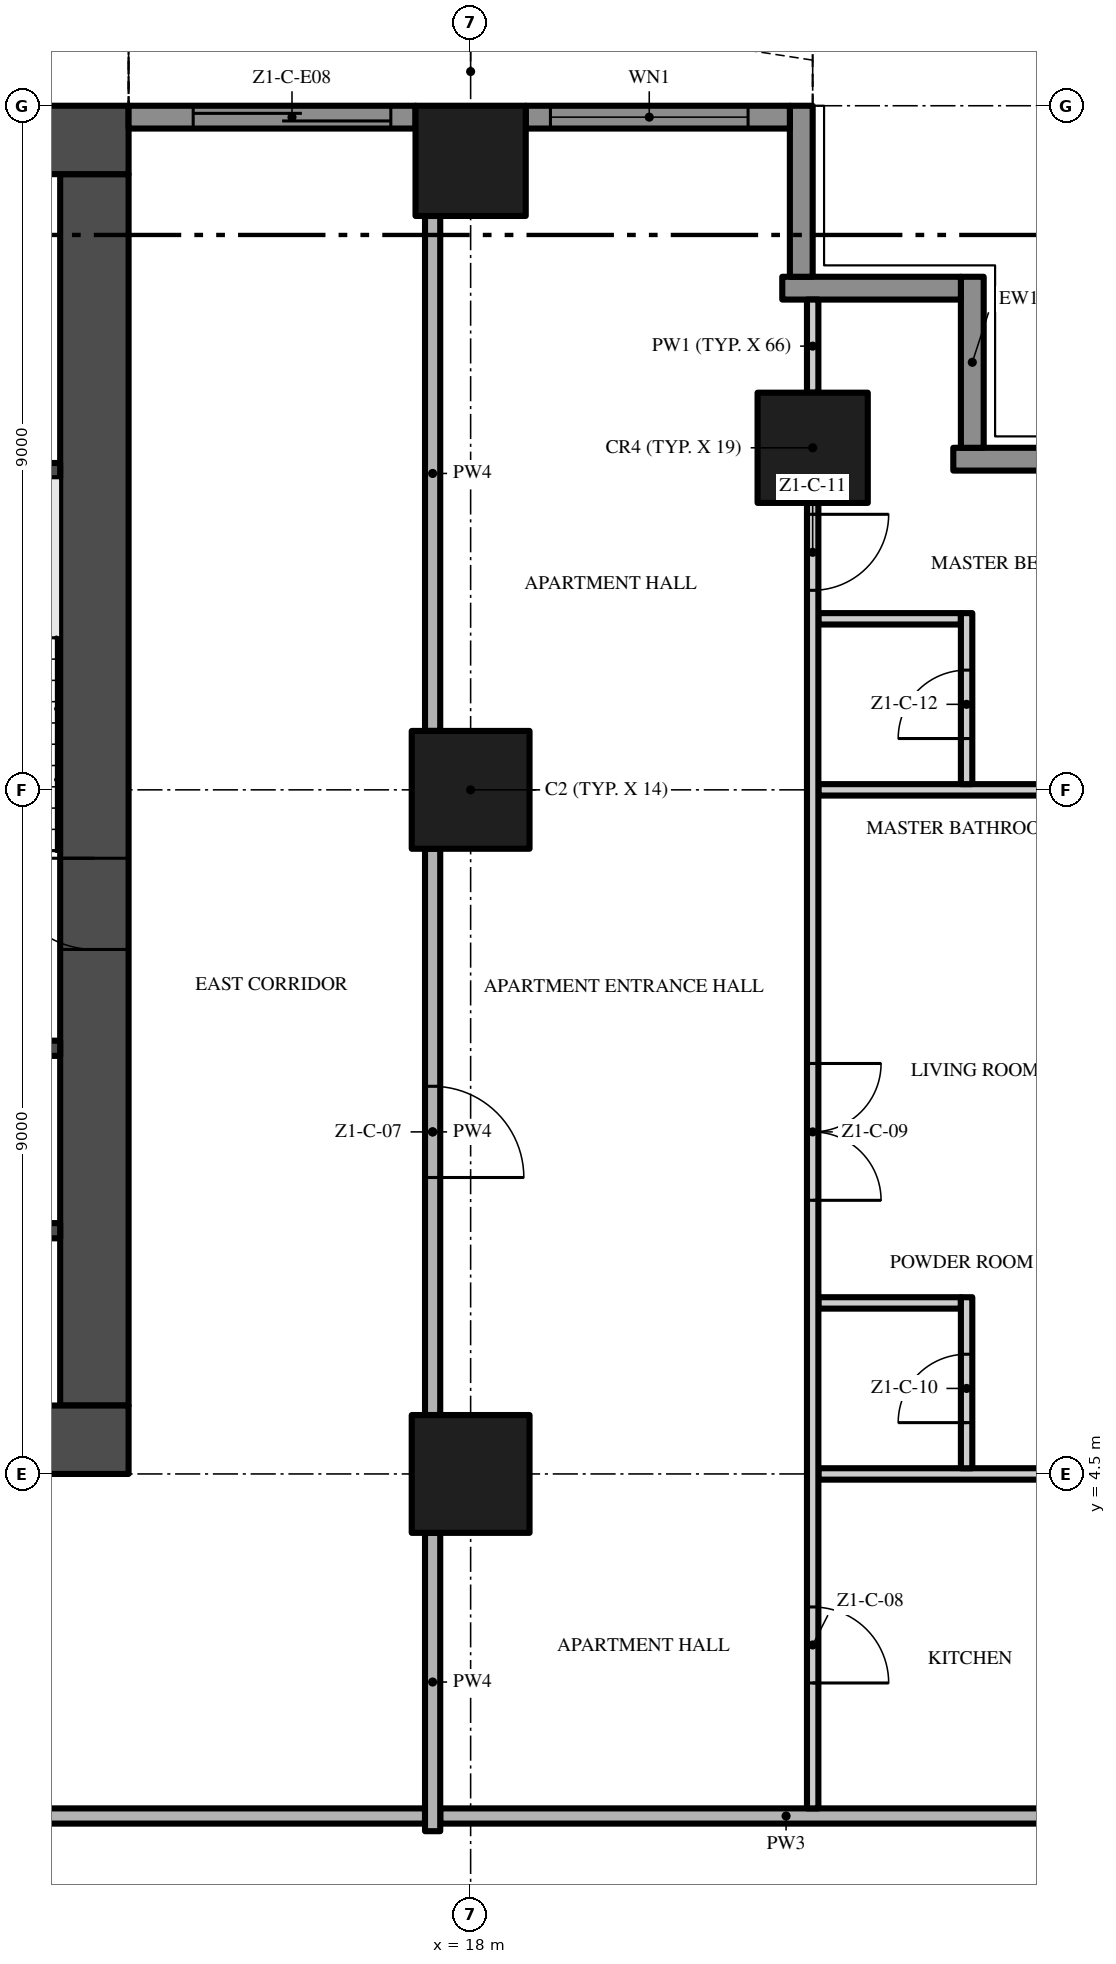
"""IFC4 building model, lengths in metres.
Left out: names, types, materials, properties, quantities, classifications, styles, units other than length and angle.
Written with IfcOpenShell. Run it as: python <this file> out.ifc"""

import sys

from ifc_helpers import new_model, si_unit, direction, frame, frame_2d, origin, origin_2d, place, context, subcontext, project, spatial, polyline, rectangle, outline, extrude, element, fill, save


model = new_model("IFC4")
c1 = context("Model", 3, precision=1e-05, world=origin(), true_north=direction((0.0, 1.0)))
c2 = subcontext(c1, "Body", "Model", "MODEL_VIEW")
j1 = project(units=[si_unit("LENGTHUNIT", "METRE"), si_unit("PLANEANGLEUNIT", "RADIAN")], contexts=[c1])
p1 = place(None, origin())
s1 = spatial("IfcSite", under=j1, at=p1, CompositionType="ELEMENT")
p2 = place(p1, origin())
s2 = spatial("IfcBuilding", under=s1, at=p2, CompositionType="ELEMENT")
p3 = place(p2, frame((0.0, 0.0, 37.8)))
s3 = spatial("IfcBuildingStorey", under=s2, at=p3, CompositionType="ELEMENT", Elevation=37.8)
p4 = place(p3, frame((-13.5, 4.95, -0.3), z_axis=(0.0, 0.0, 1.0), x_axis=(1.0, 0.0, 0.0)))
e1 = element("IfcWall", 1, at=p4, inside=s3, PredefinedType="SHEAR", context=c2, shape_type="SweptSolid", body=[
    extrude(rectangle(XDim=27.0, YDim=0.9, at=frame_2d((13.5, 0.0))), origin(), (0.0, 0.0, 1.0), 3.8),
])
p5 = place(p4, frame((12.0, 0.0, 0.3)))
e2 = element("IfcOpeningElement", 2, at=p5, cuts=e1, PredefinedType="OPENING", context=c2, shape_type="SweptSolid", body=[
    extrude(rectangle(XDim=3.0, YDim=2.4, at=frame_2d((1.5, 1.2))), frame((0.0, 0.46, 0.0), z_axis=(0.0, -1.0, 0.0), x_axis=(1.0, 0.0, 0.0)), (0.0, 0.0, 1.0), 0.92),
])
p6 = place(p4, frame((4.9, 0.0, 0.3)))
e3 = element("IfcOpeningElement", 3, at=p6, cuts=e1, PredefinedType="OPENING", context=c2, shape_type="SweptSolid", body=[
    extrude(rectangle(XDim=1.2, YDim=2.2, at=frame_2d((0.6, 1.1))), frame((0.0, 0.46, 0.0), z_axis=(0.0, -1.0, 0.0), x_axis=(1.0, 0.0, 0.0)), (0.0, 0.0, 1.0), 0.92),
])
p7 = place(p4, frame((20.75, 0.0, 0.3)))
e4 = element("IfcOpeningElement", 4, at=p7, cuts=e1, PredefinedType="OPENING", context=c2, shape_type="SweptSolid", body=[
    extrude(rectangle(XDim=1.5, YDim=2.2, at=frame_2d((0.75, 1.1))), frame((0.0, 0.46, 0.0), z_axis=(0.0, -1.0, 0.0), x_axis=(1.0, 0.0, 0.0)), (0.0, 0.0, 1.0), 0.92),
])
p8 = place(p4, frame((17.4, 0.0, 0.3)))
e5 = element("IfcOpeningElement", 5, at=p8, cuts=e1, PredefinedType="OPENING", context=c2, shape_type="SweptSolid", body=[
    extrude(rectangle(XDim=1.2, YDim=2.2, at=frame_2d((0.6, 1.1))), frame((0.0, 0.46, 0.0), z_axis=(0.0, -1.0, 0.0), x_axis=(1.0, 0.0, 0.0)), (0.0, 0.0, 1.0), 0.92),
])
p9 = place(p3, frame((13.05, 5.4, -0.3), z_axis=(0.0, 0.0, 1.0), x_axis=(0.0, 1.0, 0.0)))
e6 = element("IfcWall", 6, at=p9, inside=s3, PredefinedType="SHEAR", context=c2, shape_type="SweptSolid", body=[
    extrude(rectangle(XDim=16.2, YDim=0.9, at=frame_2d((8.1, 0.0))), origin(), (0.0, 0.0, 1.0), 3.8),
])
p10 = place(p9, frame((6.0, 0.0, 0.3)))
e7 = element("IfcOpeningElement", 7, at=p10, cuts=e6, PredefinedType="OPENING", context=c2, shape_type="SweptSolid", body=[
    extrude(rectangle(XDim=1.2, YDim=2.2, at=frame_2d((0.6, 1.1))), frame((0.0, 0.46, 0.0), z_axis=(0.0, -1.0, 0.0), x_axis=(1.0, 0.0, 0.0)), (0.0, 0.0, 1.0), 0.92),
])
p11 = place(p3, frame((13.5, 22.05, -0.3), z_axis=(0.0, 0.0, 1.0), x_axis=(-1.0, 0.0, 0.0)))
e8 = element("IfcWall", 8, at=p11, inside=s3, PredefinedType="SHEAR", context=c2, shape_type="SweptSolid", body=[
    extrude(rectangle(XDim=27.0, YDim=0.9, at=frame_2d((13.5, 0.0))), origin(), (0.0, 0.0, 1.0), 3.8),
])
p12 = place(p3, frame((18.0, 13.5, 0.0), z_axis=(0.0, 0.0, 1.0), x_axis=(1.0, 0.0, 0.0)))
e9 = element("IfcColumn", 9, at=p12, inside=s3, PredefinedType="COLUMN", context=c2, shape_type="SweptSolid", body=[
    extrude(rectangle(XDim=1.55, YDim=1.55, at=origin_2d()), origin(), (0.0, 0.0, 1.0), 3.5),
])
p13 = place(p3, frame((18.0, 21.775, 0.0), z_axis=(0.0, 0.0, 1.0), x_axis=(1.0, 0.0, 0.0)))
e10 = element("IfcColumn", 10, at=p13, inside=s3, PredefinedType="COLUMN", context=c2, shape_type="SweptSolid", body=[
    extrude(rectangle(XDim=1.45, YDim=1.45, at=origin_2d()), origin(), (0.0, 0.0, 1.0), 3.5),
])
p14 = place(p3, frame((18.0, 4.5, 0.0), z_axis=(0.0, 0.0, 1.0), x_axis=(1.0, 0.0, 0.0)))
e11 = element("IfcColumn", 11, at=p14, inside=s3, PredefinedType="COLUMN", context=c2, shape_type="SweptSolid", body=[
    extrude(rectangle(XDim=1.55, YDim=1.55, at=origin_2d()), origin(), (0.0, 0.0, 1.0), 3.5),
])
p15 = place(p3, frame((22.5, 18.0, 0.0), z_axis=(0.0, 0.0, 1.0), x_axis=(1.0, 0.0, 0.0)))
e12 = element("IfcColumn", 12, at=p15, inside=s3, PredefinedType="COLUMN", context=c2, shape_type="SweptSolid", body=[
    extrude(rectangle(XDim=1.45, YDim=1.45, at=origin_2d()), origin(), (0.0, 0.0, 1.0), 3.5),
])
p16 = place(p3, frame((24.35, 17.85, 0.0), z_axis=(0.0, 0.0, 1.0), x_axis=(1.0, 0.0, 0.0)))
e13 = element("IfcWall", 13, at=p16, inside=s3, PredefinedType="SOLIDWALL", context=c2, shape_type="SweptSolid", body=[
    extrude(rectangle(XDim=2.35, YDim=0.3, at=frame_2d((1.175, 0.0))), origin(), (0.0, 0.0, 1.0), 3.5),
])
p17 = place(p3, frame((24.6, 20.25, 0.0), z_axis=(0.0, 0.0, 1.0), x_axis=(0.0, -1.0, 0.0)))
e14 = element("IfcWall", 14, at=p17, inside=s3, PredefinedType="SOLIDWALL", context=c2, shape_type="SweptSolid", body=[
    extrude(rectangle(XDim=2.25, YDim=0.3, at=frame_2d((1.125, 0.0))), origin(), (0.0, 0.0, 1.0), 3.5),
])
p18 = place(p3, frame((22.1, 20.1, 0.0), z_axis=(0.0, 0.0, 1.0), x_axis=(1.0, 0.0, 0.0)))
e15 = element("IfcWall", 15, at=p18, inside=s3, PredefinedType="SOLIDWALL", context=c2, shape_type="SweptSolid", body=[
    extrude(rectangle(XDim=2.35, YDim=0.3, at=frame_2d((1.175, 0.0))), origin(), (0.0, 0.0, 1.0), 3.5),
])
p19 = place(p3, frame((22.35, 22.5, 0.0), z_axis=(0.0, 0.0, 1.0), x_axis=(0.0, -1.0, 0.0)))
e16 = element("IfcWall", 16, at=p19, inside=s3, PredefinedType="SOLIDWALL", context=c2, shape_type="SweptSolid", body=[
    extrude(rectangle(XDim=2.25, YDim=0.3, at=frame_2d((1.125, 0.0))), origin(), (0.0, 0.0, 1.0), 3.5),
])
p20 = place(p3, frame((18.725, 22.35, 0.0), z_axis=(0.0, 0.0, 1.0), x_axis=(1.0, 0.0, 0.0)))
e17 = element("IfcWall", 17, at=p20, inside=s3, PredefinedType="SOLIDWALL", context=c2, shape_type="SweptSolid", body=[
    extrude(rectangle(XDim=3.475, YDim=0.3, at=frame_2d((1.738, 0.0))), origin(), (0.0, 0.0, 1.0), 3.5),
])
p21 = place(p20, frame((0.325, 0.0, 0.45)))
e18 = element("IfcOpeningElement", 18, at=p21, cuts=e17, PredefinedType="OPENING", context=c2, shape_type="SweptSolid", body=[
    extrude(rectangle(XDim=2.6, YDim=2.65, at=frame_2d((1.3, 1.325))), frame((0.0, 0.16, 0.0), z_axis=(0.0, -1.0, 0.0), x_axis=(1.0, 0.0, 0.0)), (0.0, 0.0, 1.0), 0.32),
])
p22 = place(p3, frame((13.5, 22.35, 0.0), z_axis=(0.0, 0.0, 1.0), x_axis=(1.0, 0.0, 0.0)))
e19 = element("IfcWall", 19, at=p22, inside=s3, PredefinedType="SOLIDWALL", context=c2, shape_type="SweptSolid", body=[
    extrude(rectangle(XDim=3.775, YDim=0.3, at=frame_2d((1.887, 0.0))), origin(), (0.0, 0.0, 1.0), 3.5),
])
p23 = place(p22, frame((0.85, 0.0, 0.0)))
e20 = element("IfcOpeningElement", 20, at=p23, cuts=e19, PredefinedType="OPENING", context=c2, shape_type="SweptSolid", body=[
    extrude(rectangle(XDim=2.6, YDim=2.4, at=frame_2d((1.3, 1.2))), frame((0.0, 0.16, 0.0), z_axis=(0.0, -1.0, 0.0), x_axis=(1.0, 0.0, 0.0)), (0.0, 0.0, 1.0), 0.32),
])
p24 = place(p3, origin())
e21 = element("IfcWall", 21, at=p24, inside=s3, PredefinedType="USERDEFINED", context=c2, shape_type="SweptSolid", body=[
    extrude(outline(polyline([(22.5, 23.1), (21.0, 23.329), (19.5, 23.929), (18.0, 24.671), (16.5, 25.271), (15.0, 25.5), (13.5, 25.271), (13.538, 25.024), (15.0, 25.247), (16.434, 25.028), (17.898, 24.442), (19.398, 23.701), (20.934, 23.086), (22.462, 22.853), (22.5, 23.1)])), origin(), (0.0, 0.0, 1.0), 0.9),
])
for number, where, z_axis, x_axis in (
    (22, (9.65, 7.7, 0.0), (0.0, 0.0, 1.0), (1.0, 0.0, 0.0)),
    (23, (9.65, 10.1, 0.0), (0.0, 0.0, 1.0), (1.0, 0.0, 0.0)),
    (24, (9.65, 17.7, 0.0), (0.0, 0.0, 1.0), (1.0, 0.0, 0.0)),
):
    element("IfcWall", number, at=place(p3, frame(where, z_axis=z_axis, x_axis=x_axis)), inside=s3, PredefinedType="SHEAR", context=c2, shape_type="SweptSolid", body=[
        extrude(rectangle(XDim=2.95, YDim=0.2, at=frame_2d((1.475, 0.0))), origin(), (0.0, 0.0, 1.0), 3.5),
    ])
p25 = place(p3, frame((17.4, 0.0, 0.0), z_axis=(0.0, 0.0, 1.0), x_axis=(-1.0, 0.0, 0.0)))
e25 = element("IfcWall", 25, at=p25, inside=s3, PredefinedType="PARTITIONING", context=c2, shape_type="SweptSolid", body=[
    extrude(rectangle(XDim=17.3, YDim=0.2, at=frame_2d((8.65, 0.0))), origin(), (0.0, 0.0, 1.0), 3.5),
])
p26 = place(p25, frame((7.65, 0.0, 0.0)))
e26 = element("IfcOpeningElement", 26, at=p26, cuts=e25, PredefinedType="OPENING", context=c2, shape_type="SweptSolid", body=[
    extrude(rectangle(XDim=1.5, YDim=2.4, at=frame_2d((0.75, 1.2))), frame((0.0, 0.11, 0.0), z_axis=(0.0, -1.0, 0.0), x_axis=(1.0, 0.0, 0.0)), (0.0, 0.0, 1.0), 0.22),
])
p27 = place(p3, frame((17.6, 0.0, 0.0), z_axis=(0.0, 0.0, 1.0), x_axis=(1.0, 0.0, 0.0)))
e27 = element("IfcWall", 27, at=p27, inside=s3, PredefinedType="PARTITIONING", context=c2, shape_type="SweptSolid", body=[
    extrude(rectangle(XDim=9.1, YDim=0.2, at=frame_2d((4.55, 0.0))), origin(), (0.0, 0.0, 1.0), 3.5),
])
p28 = place(p3, frame((22.575, 4.5, 0.0), z_axis=(0.0, 0.0, 1.0), x_axis=(1.0, 0.0, 0.0)))
e28 = element("IfcWall", 28, at=p28, inside=s3, PredefinedType="PARTITIONING", context=c2, shape_type="SweptSolid", body=[
    extrude(rectangle(XDim=2.975, YDim=0.15, at=frame_2d((1.488, 0.0))), origin(), (0.0, 0.0, 1.0), 3.5),
])
p29 = place(p3, frame((22.575, 6.75, 0.0), z_axis=(0.0, 0.0, 1.0), x_axis=(1.0, 0.0, 0.0)))
e29 = element("IfcWall", 29, at=p29, inside=s3, PredefinedType="PARTITIONING", context=c2, shape_type="SweptSolid", body=[
    extrude(rectangle(XDim=1.875, YDim=0.15, at=frame_2d((0.938, 0.0))), origin(), (0.0, 0.0, 1.0), 3.5),
])
p30 = place(p3, frame((22.575, 13.5, 0.0), z_axis=(0.0, 0.0, 1.0), x_axis=(1.0, 0.0, 0.0)))
e30 = element("IfcWall", 30, at=p30, inside=s3, PredefinedType="PARTITIONING", context=c2, shape_type="SweptSolid", body=[
    extrude(rectangle(XDim=2.975, YDim=0.15, at=frame_2d((1.488, 0.0))), origin(), (0.0, 0.0, 1.0), 3.5),
])
p31 = place(p3, frame((22.575, 15.75, 0.0), z_axis=(0.0, 0.0, 1.0), x_axis=(1.0, 0.0, 0.0)))
e31 = element("IfcWall", 31, at=p31, inside=s3, PredefinedType="PARTITIONING", context=c2, shape_type="SweptSolid", body=[
    extrude(rectangle(XDim=1.875, YDim=0.15, at=frame_2d((0.938, 0.0))), origin(), (0.0, 0.0, 1.0), 3.5),
])
p32 = place(p3, frame((17.5, -0.2, 0.0), z_axis=(0.0, 0.0, 1.0), x_axis=(0.0, 1.0, 0.0)))
e32 = element("IfcWall", 32, at=p32, inside=s3, PredefinedType="PARTITIONING", context=c2, shape_type="SweptSolid", body=[
    extrude(rectangle(XDim=3.925, YDim=0.2, at=frame_2d((1.962, 0.0))), origin(), (0.0, 0.0, 1.0), 3.5),
])
p33 = place(p3, frame((17.5, 12.725, 0.0), z_axis=(0.0, 0.0, 1.0), x_axis=(0.0, -1.0, 0.0)))
e33 = element("IfcWall", 33, at=p33, inside=s3, PredefinedType="PARTITIONING", context=c2, shape_type="SweptSolid", body=[
    extrude(rectangle(XDim=7.45, YDim=0.2, at=frame_2d((3.725, 0.0))), origin(), (0.0, 0.0, 1.0), 3.5),
])
p34 = place(p33, frame((3.125, 0.0, 0.0)))
e34 = element("IfcOpeningElement", 34, at=p34, cuts=e33, PredefinedType="OPENING", context=c2, shape_type="SweptSolid", body=[
    extrude(rectangle(XDim=1.2, YDim=2.4, at=frame_2d((0.6, 1.2))), frame((0.0, 0.11, 0.0), z_axis=(0.0, -1.0, 0.0), x_axis=(1.0, 0.0, 0.0)), (0.0, 0.0, 1.0), 0.22),
])
p35 = place(p3, frame((17.5, 14.275, 0.0), z_axis=(0.0, 0.0, 1.0), x_axis=(0.0, 1.0, 0.0)))
e35 = element("IfcWall", 35, at=p35, inside=s3, PredefinedType="PARTITIONING", context=c2, shape_type="SweptSolid", body=[
    extrude(rectangle(XDim=6.775, YDim=0.2, at=frame_2d((3.388, 0.0))), origin(), (0.0, 0.0, 1.0), 3.5),
])
p36 = place(p3, frame((22.5, 17.275, 0.0), z_axis=(0.0, 0.0, 1.0), x_axis=(0.0, -1.0, 0.0)))
e36 = element("IfcWall", 36, at=p36, inside=s3, PredefinedType="PARTITIONING", context=c2, shape_type="SweptSolid", body=[
    extrude(rectangle(XDim=17.175, YDim=0.15, at=frame_2d((8.588, 0.0))), origin(), (0.0, 0.0, 1.0), 3.5),
])
p37 = place(p36, frame((14.525, 0.0, 0.0)))
e37 = element("IfcOpeningElement", 37, at=p37, cuts=e36, PredefinedType="OPENING", context=c2, shape_type="SweptSolid", body=[
    extrude(rectangle(XDim=1.0, YDim=2.4, at=frame_2d((0.5, 1.2))), frame((0.0, 0.085, 0.0), z_axis=(0.0, -1.0, 0.0), x_axis=(1.0, 0.0, 0.0)), (0.0, 0.0, 1.0), 0.17),
])
p38 = place(p36, frame((7.375, 0.0, 0.0)))
e38 = element("IfcOpeningElement", 38, at=p38, cuts=e36, PredefinedType="OPENING", context=c2, shape_type="SweptSolid", body=[
    extrude(rectangle(XDim=1.8, YDim=2.4, at=frame_2d((0.9, 1.2))), frame((0.0, 0.085, 0.0), z_axis=(0.0, -1.0, 0.0), x_axis=(1.0, 0.0, 0.0)), (0.0, 0.0, 1.0), 0.17),
])
p39 = place(p36, frame((0.15, 0.0, 0.0)))
e39 = element("IfcOpeningElement", 39, at=p39, cuts=e36, PredefinedType="OPENING", context=c2, shape_type="SweptSolid", body=[
    extrude(rectangle(XDim=1.0, YDim=2.4, at=frame_2d((0.5, 1.2))), frame((0.0, 0.085, 0.0), z_axis=(0.0, -1.0, 0.0), x_axis=(1.0, 0.0, 0.0)), (0.0, 0.0, 1.0), 0.17),
])
p40 = place(p3, frame((22.5, 18.725, 0.0), z_axis=(0.0, 0.0, 1.0), x_axis=(0.0, 1.0, 0.0)))
e40 = element("IfcWall", 40, at=p40, inside=s3, PredefinedType="PARTITIONING", context=c2, shape_type="SweptSolid", body=[
    extrude(rectangle(XDim=1.225, YDim=0.15, at=frame_2d((0.613, 0.0))), origin(), (0.0, 0.0, 1.0), 3.5),
])
p41 = place(p3, frame((24.525, 4.575, 0.0), z_axis=(0.0, 0.0, 1.0), x_axis=(0.0, 1.0, 0.0)))
e41 = element("IfcWall", 41, at=p41, inside=s3, PredefinedType="PARTITIONING", context=c2, shape_type="SweptSolid", body=[
    extrude(rectangle(XDim=2.25, YDim=0.15, at=frame_2d((1.125, 0.0))), origin(), (0.0, 0.0, 1.0), 3.5),
])
p42 = place(p41, frame((0.6, 0.0, 0.0)))
e42 = element("IfcOpeningElement", 42, at=p42, cuts=e41, PredefinedType="OPENING", context=c2, shape_type="SweptSolid", body=[
    extrude(rectangle(XDim=0.9, YDim=2.1, at=frame_2d((0.45, 1.05))), frame((0.0, 0.085, 0.0), z_axis=(0.0, -1.0, 0.0), x_axis=(1.0, 0.0, 0.0)), (0.0, 0.0, 1.0), 0.17),
])
p43 = place(p3, frame((24.525, 13.575, 0.0), z_axis=(0.0, 0.0, 1.0), x_axis=(0.0, 1.0, 0.0)))
e43 = element("IfcWall", 43, at=p43, inside=s3, PredefinedType="PARTITIONING", context=c2, shape_type="SweptSolid", body=[
    extrude(rectangle(XDim=2.25, YDim=0.15, at=frame_2d((1.125, 0.0))), origin(), (0.0, 0.0, 1.0), 3.5),
])
p44 = place(p43, frame((0.6, 0.0, 0.0)))
e44 = element("IfcOpeningElement", 44, at=p44, cuts=e43, PredefinedType="OPENING", context=c2, shape_type="SweptSolid", body=[
    extrude(rectangle(XDim=0.9, YDim=2.1, at=frame_2d((0.45, 1.05))), frame((0.0, 0.085, 0.0), z_axis=(0.0, -1.0, 0.0), x_axis=(1.0, 0.0, 0.0)), (0.0, 0.0, 1.0), 0.17),
])
p45 = place(p21, origin())
e45 = element("IfcWindow", 45, at=p45, inside=s3, PartitioningType="SINGLE_PANEL", PredefinedType="WINDOW", context=c2, shape_type="SweptSolid", body=[
    extrude(rectangle(XDim=2.6, YDim=2.65, at=frame_2d((1.3, 1.325))), frame((0.0, 0.03, 0.0), z_axis=(0.0, -1.0, 0.0), x_axis=(1.0, 0.0, 0.0)), (0.0, 0.0, 1.0), 0.06),
])
fill(e18, e45)
p46 = place(p23, origin())
e46 = element("IfcDoor", 46, at=p46, inside=s3, OperationType="SINGLE_SWING_LEFT", PredefinedType="DOOR", context=c2, shape_type="SweptSolid", body=[
    extrude(rectangle(XDim=2.6, YDim=2.4, at=frame_2d((1.3, 1.2))), frame((0.0, 0.025, 0.0), z_axis=(0.0, -1.0, 0.0), x_axis=(1.0, 0.0, 0.0)), (0.0, 0.0, 1.0), 0.05),
])
fill(e20, e46)
p47 = place(p10, frame((1.2, 0.0, 0.0), z_axis=(0.0, 0.0, 1.0), x_axis=(-1.0, 0.0, 0.0)))
e47 = element("IfcDoor", 47, at=p47, inside=s3, OperationType="SINGLE_SWING_LEFT", PredefinedType="DOOR", context=c2, shape_type="SweptSolid", body=[
    extrude(rectangle(XDim=1.2, YDim=2.2, at=frame_2d((0.6, 1.1))), frame((0.0, 0.025, 0.0), z_axis=(0.0, -1.0, 0.0), x_axis=(1.0, 0.0, 0.0)), (0.0, 0.0, 1.0), 0.05),
])
fill(e7, e47)
p48 = place(p34, origin())
e48 = element("IfcDoor", 48, at=p48, inside=s3, OperationType="SINGLE_SWING_RIGHT", PredefinedType="DOOR", context=c2, shape_type="SweptSolid", body=[
    extrude(rectangle(XDim=1.2, YDim=2.4, at=frame_2d((0.6, 1.2))), frame((0.0, 0.025, 0.0), z_axis=(0.0, -1.0, 0.0), x_axis=(1.0, 0.0, 0.0)), (0.0, 0.0, 1.0), 0.05),
])
fill(e34, e48)
p49 = place(p37, origin())
e49 = element("IfcDoor", 49, at=p49, inside=s3, OperationType="SINGLE_SWING_RIGHT", PredefinedType="DOOR", context=c2, shape_type="SweptSolid", body=[
    extrude(rectangle(XDim=1.0, YDim=2.4, at=frame_2d((0.5, 1.2))), frame((0.0, 0.025, 0.0), z_axis=(0.0, -1.0, 0.0), x_axis=(1.0, 0.0, 0.0)), (0.0, 0.0, 1.0), 0.05),
])
fill(e37, e49)
p50 = place(p38, origin())
e50 = element("IfcDoor", 50, at=p50, inside=s3, OperationType="DOUBLE_DOOR_SINGLE_SWING", PredefinedType="DOOR", context=c2, shape_type="SweptSolid", body=[
    extrude(rectangle(XDim=1.8, YDim=2.4, at=frame_2d((0.9, 1.2))), frame((0.0, 0.025, 0.0), z_axis=(0.0, -1.0, 0.0), x_axis=(1.0, 0.0, 0.0)), (0.0, 0.0, 1.0), 0.05),
])
fill(e38, e50)
p51 = place(p42, origin())
e51 = element("IfcDoor", 51, at=p51, inside=s3, OperationType="SINGLE_SWING_LEFT", PredefinedType="DOOR", context=c2, shape_type="SweptSolid", body=[
    extrude(rectangle(XDim=0.9, YDim=2.1, at=frame_2d((0.45, 1.05))), frame((0.0, 0.025, 0.0), z_axis=(0.0, -1.0, 0.0), x_axis=(1.0, 0.0, 0.0)), (0.0, 0.0, 1.0), 0.05),
])
fill(e42, e51)
p52 = place(p39, origin())
e52 = element("IfcDoor", 52, at=p52, inside=s3, OperationType="SINGLE_SWING_LEFT", PredefinedType="DOOR", context=c2, shape_type="SweptSolid", body=[
    extrude(rectangle(XDim=1.0, YDim=2.4, at=frame_2d((0.5, 1.2))), frame((0.0, 0.025, 0.0), z_axis=(0.0, -1.0, 0.0), x_axis=(1.0, 0.0, 0.0)), (0.0, 0.0, 1.0), 0.05),
])
fill(e39, e52)
p53 = place(p44, origin())
e53 = element("IfcDoor", 53, at=p53, inside=s3, OperationType="SINGLE_SWING_LEFT", PredefinedType="DOOR", context=c2, shape_type="SweptSolid", body=[
    extrude(rectangle(XDim=0.9, YDim=2.1, at=frame_2d((0.45, 1.05))), frame((0.0, 0.025, 0.0), z_axis=(0.0, -1.0, 0.0), x_axis=(1.0, 0.0, 0.0)), (0.0, 0.0, 1.0), 0.05),
])
fill(e44, e53)
save(model, sys.argv[1])
